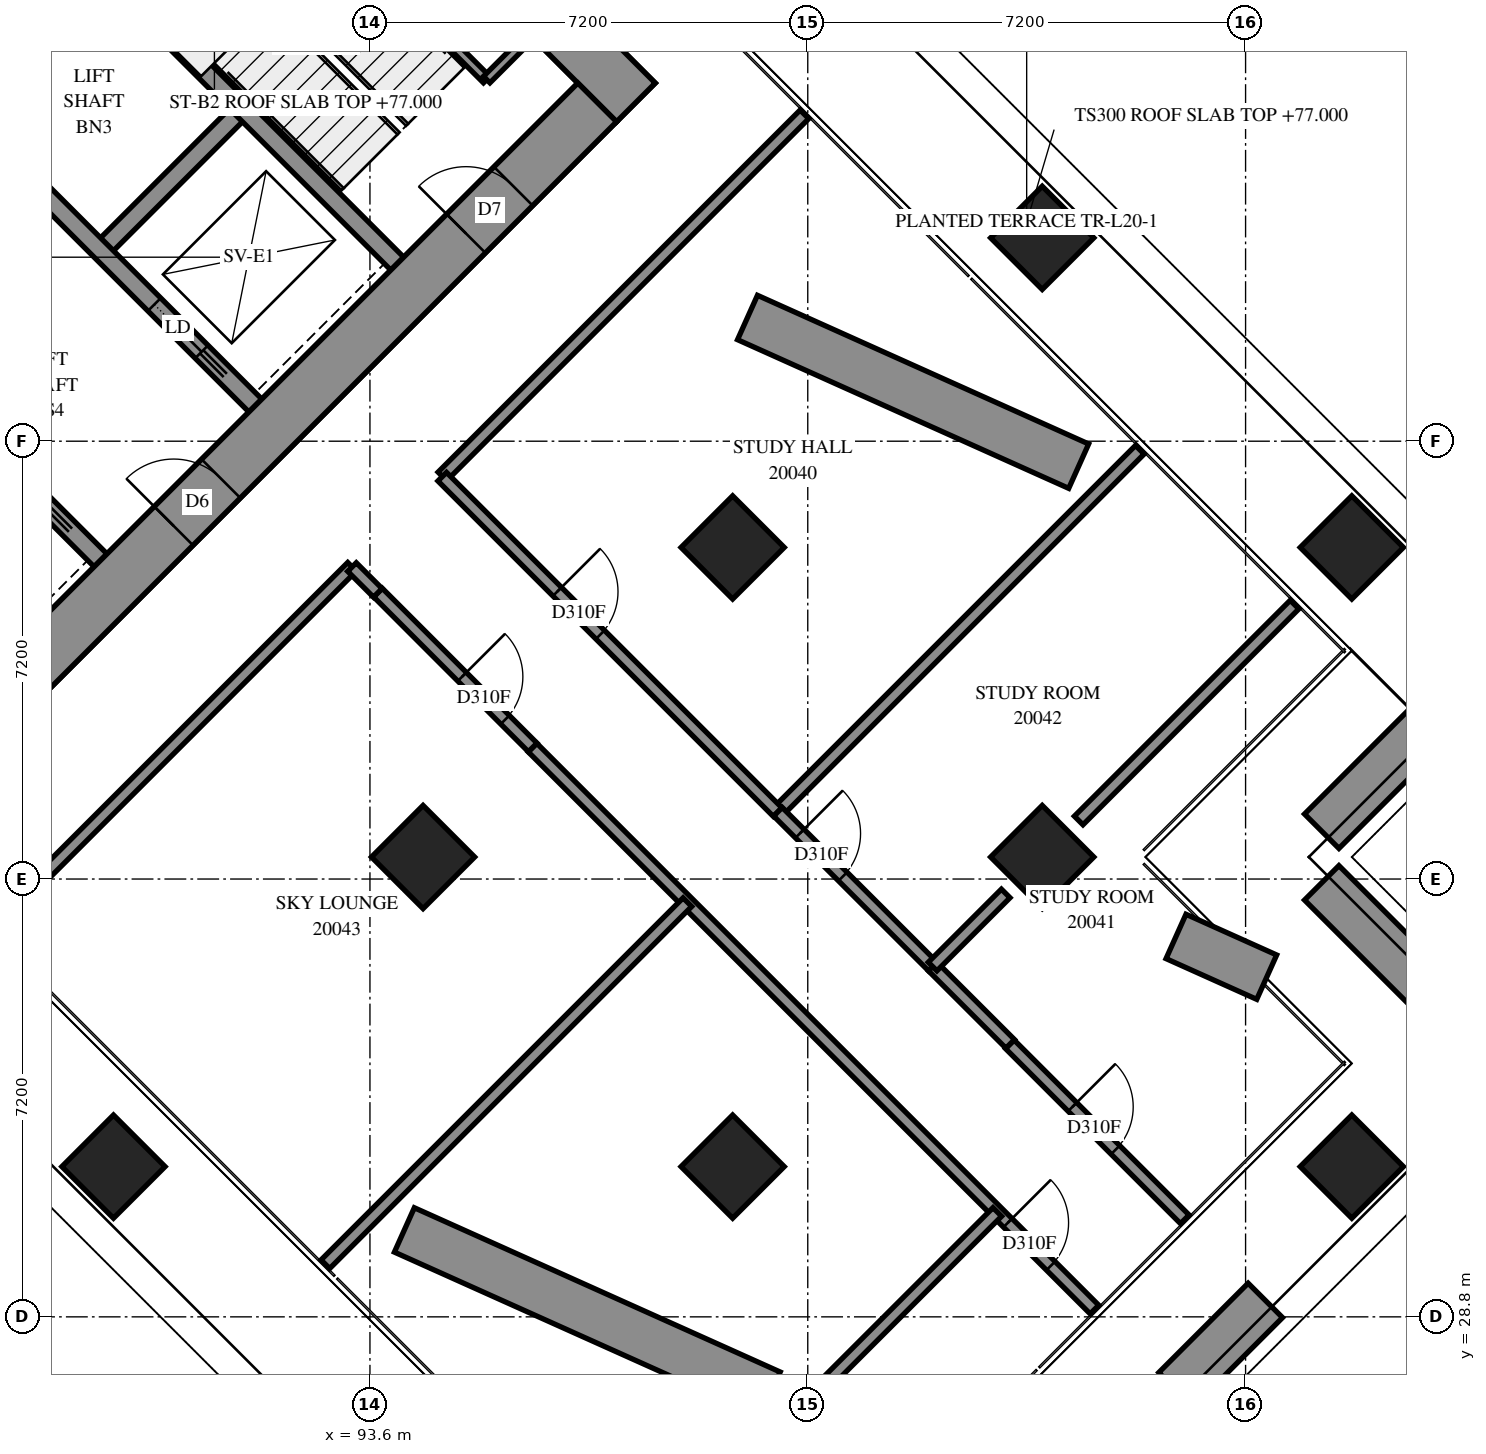
"""IFC4 building model, lengths in metres.
Left out: names, types, materials, properties, quantities, classifications, styles, units other than length and angle.
Written with IfcOpenShell. Run it as: python <this file> out.ifc"""

import sys

from ifc_helpers import new_model, si_unit, direction, frame, frame_2d, origin, origin_2d, place, context, subcontext, project, spatial, polyline, rectangle, outline, extrude, element, fill, save


model = new_model("IFC4")
c1 = context("Model", 3, precision=1e-05, world=origin(), true_north=direction((0.0, 1.0)))
c2 = subcontext(c1, "Body", "Model", "MODEL_VIEW")
j1 = project(units=[si_unit("LENGTHUNIT", "METRE"), si_unit("PLANEANGLEUNIT", "RADIAN")], contexts=[c1])
p1 = place(None, origin())
s1 = spatial("IfcSite", under=j1, at=p1, CompositionType="ELEMENT")
p2 = place(p1, origin())
s2 = spatial("IfcBuilding", under=s1, at=p2, CompositionType="ELEMENT")
p3 = place(p2, frame((0.0, 0.0, 77.0)))
s3 = spatial("IfcBuildingStorey", under=s2, at=p3, CompositionType="ELEMENT", Elevation=77.0)
for number, where, z_axis, x_axis in (
    (1, (104.656, 46.544, 0.0), (0.0, 0.0, 1.0), (0.707, -0.707, 0.0)),
    (2, (99.565, 41.453, 0.0), (0.0, 0.0, 1.0), (0.707, -0.707, 0.0)),
    (3, (94.474, 36.362, 0.0), (0.0, 0.0, 1.0), (0.707, -0.707, 0.0)),
    (4, (89.382, 31.271, 0.0), (0.0, 0.0, 1.0), (0.707, -0.707, 0.0)),
    (5, (109.747, 41.453, 0.0), (0.0, 0.0, 1.0), (0.707, -0.707, 0.0)),
    (6, (104.656, 36.362, 0.0), (0.0, 0.0, 1.0), (0.707, -0.707, 0.0)),
    (7, (99.565, 31.271, 0.0), (0.0, 0.0, 1.0), (0.707, -0.707, 0.0)),
    (8, (109.747, 31.271, 0.0), (0.0, 0.0, 1.0), (0.707, -0.707, 0.0)),
):
    element("IfcColumn", number, at=place(p3, frame(where, z_axis=z_axis, x_axis=x_axis)), inside=s3, PredefinedType="COLUMN", context=c2, shape_type="SweptSolid", body=[
        extrude(rectangle(XDim=1.2, YDim=1.2, at=origin_2d()), origin(), (0.0, 0.0, 1.0), 3.9),
    ])
p4 = place(p3, frame((86.519, 60.227, -0.3), z_axis=(0.0, 0.0, 1.0), x_axis=(0.7071036948, -0.7071098676, 0.0)))
e9 = element("IfcWall", 9, at=p4, inside=s3, PredefinedType="SHEAR", context=c2, shape_type="SweptSolid", body=[
    extrude(rectangle(XDim=16.2, YDim=0.9, at=frame_2d((8.1, 0.0))), origin(), (0.0, 0.0, 1.0), 3.5),
])
p5 = place(p4, frame((10.9, 0.0, 0.3)))
e10 = element("IfcOpeningElement", 10, at=p5, cuts=e9, PredefinedType="OPENING", context=c2, shape_type="SweptSolid", body=[
    extrude(rectangle(XDim=0.8, YDim=2.1, at=frame_2d((0.4, 1.05))), frame((0.0, 0.46, 0.0), z_axis=(0.0, -1.0, 0.0), x_axis=(1.0, 0.0, 0.0)), (0.0, 0.0, 1.0), 0.92),
])
p6 = place(p3, frame((87.155, 38.589, -0.3), z_axis=(0.0, 0.0, 1.0), x_axis=(0.7071067812, 0.7071067812, 0.0)))
e11 = element("IfcWall", 11, at=p6, inside=s3, PredefinedType="SHEAR", context=c2, shape_type="SweptSolid", body=[
    extrude(rectangle(XDim=14.4, YDim=0.9, at=frame_2d((7.2, 0.0))), origin(), (0.0, 0.0, 1.0), 3.5),
])
p7 = place(p6, frame((4.55, 0.0, 0.3)))
e12 = element("IfcOpeningElement", 12, at=p7, cuts=e11, PredefinedType="OPENING", context=c2, shape_type="SweptSolid", body=[
    extrude(rectangle(XDim=1.1, YDim=2.1, at=frame_2d((0.55, 1.05))), frame((0.0, 0.46, 0.0), z_axis=(0.0, -1.0, 0.0), x_axis=(1.0, 0.0, 0.0)), (0.0, 0.0, 1.0), 0.92),
])
p8 = place(p6, frame((11.35, 0.0, 0.3)))
e13 = element("IfcOpeningElement", 13, at=p8, cuts=e11, PredefinedType="OPENING", context=c2, shape_type="SweptSolid", body=[
    extrude(rectangle(XDim=1.1, YDim=2.1, at=frame_2d((0.55, 1.05))), frame((0.0, 0.46, 0.0), z_axis=(0.0, -1.0, 0.0), x_axis=(1.0, 0.0, 0.0)), (0.0, 0.0, 1.0), 0.92),
])
for number, where, z_axis, x_axis in (
    (14, (86.625, 48.878, 0.0), (0.0, 0.0, 1.0), (0.707, 0.707, 0.0)),
    (15, (89.17, 46.332, 0.0), (0.0, 0.0, 1.0), (0.707, 0.707, 0.0)),
):
    element("IfcWall", number, at=place(p3, frame(where, z_axis=z_axis, x_axis=x_axis)), inside=s3, PredefinedType="SOLIDWALL", context=c2, shape_type="SweptSolid", body=[
        extrude(rectangle(XDim=3.3, YDim=0.3, at=frame_2d((1.65, 0.0))), origin(), (0.0, 0.0, 1.0), 3.9),
    ])
p9 = place(p3, frame((78.988, 51.423, 0.0), z_axis=(0.0, 0.0, 1.0), x_axis=(0.7071067812, -0.7071067812, 0.0)))
e16 = element("IfcWall", 16, at=p9, inside=s3, PredefinedType="SOLIDWALL", context=c2, shape_type="SweptSolid", body=[
    extrude(rectangle(XDim=14.4, YDim=0.3, at=frame_2d((7.2, 0.0))), origin(), (0.0, 0.0, 1.0), 3.9),
])
p10 = place(p9, frame((1.25, 0.0, 0.0)))
e17 = element("IfcOpeningElement", 17, at=p10, cuts=e16, PredefinedType="OPENING", context=c2, shape_type="SweptSolid", body=[
    extrude(rectangle(XDim=1.1, YDim=2.1, at=frame_2d((0.55, 1.05))), frame((0.0, 0.16, 0.0), z_axis=(0.0, -1.0, 0.0), x_axis=(1.0, 0.0, 0.0)), (0.0, 0.0, 1.0), 0.32),
])
p11 = place(p9, frame((4.85, 0.0, 0.0)))
e18 = element("IfcOpeningElement", 18, at=p11, cuts=e16, PredefinedType="OPENING", context=c2, shape_type="SweptSolid", body=[
    extrude(rectangle(XDim=1.1, YDim=2.1, at=frame_2d((0.55, 1.05))), frame((0.0, 0.16, 0.0), z_axis=(0.0, -1.0, 0.0), x_axis=(1.0, 0.0, 0.0)), (0.0, 0.0, 1.0), 0.32),
])
p12 = place(p9, frame((8.45, 0.0, 0.0)))
e19 = element("IfcOpeningElement", 19, at=p12, cuts=e16, PredefinedType="OPENING", context=c2, shape_type="SweptSolid", body=[
    extrude(rectangle(XDim=1.1, YDim=2.1, at=frame_2d((0.55, 1.05))), frame((0.0, 0.16, 0.0), z_axis=(0.0, -1.0, 0.0), x_axis=(1.0, 0.0, 0.0)), (0.0, 0.0, 1.0), 0.32),
])
p13 = place(p9, frame((12.05, 0.0, 0.0)))
e20 = element("IfcOpeningElement", 20, at=p13, cuts=e16, PredefinedType="OPENING", context=c2, shape_type="SweptSolid", body=[
    extrude(rectangle(XDim=1.1, YDim=2.1, at=frame_2d((0.55, 1.05))), frame((0.0, 0.16, 0.0), z_axis=(0.0, -1.0, 0.0), x_axis=(1.0, 0.0, 0.0)), (0.0, 0.0, 1.0), 0.32),
])
p14 = place(p3, frame((81.534, 53.969, 0.0), z_axis=(0.0, 0.0, 1.0), x_axis=(0.707103309, -0.7071102534, 0.0)))
e21 = element("IfcWall", 21, at=p14, inside=s3, PredefinedType="SOLIDWALL", context=c2, shape_type="SweptSolid", body=[
    extrude(rectangle(XDim=14.4, YDim=0.3, at=frame_2d((7.2, 0.0))), origin(), (0.0, 0.0, 1.0), 3.9),
])
p15 = place(p14, frame((12.05, 0.0, 0.0)))
e22 = element("IfcOpeningElement", 22, at=p15, cuts=e21, PredefinedType="OPENING", context=c2, shape_type="SweptSolid", body=[
    extrude(rectangle(XDim=1.1, YDim=2.1, at=frame_2d((0.55, 1.05))), frame((0.0, 0.16, 0.0), z_axis=(0.0, -1.0, 0.0), x_axis=(1.0, 0.0, 0.0)), (0.0, 0.0, 1.0), 0.32),
])
p16 = place(p3, frame((88.958, 51.211, 0.0), z_axis=(0.0, 0.0, 1.0), x_axis=(0.7070998367, -0.7071137256, 0.0)))
e23 = element("IfcWall", 23, at=p16, inside=s3, PredefinedType="SOLIDWALL", context=c2, shape_type="SweptSolid", body=[
    extrude(rectangle(XDim=7.2, YDim=0.3, at=frame_2d((3.6, 0.0))), origin(), (0.0, 0.0, 1.0), 3.9),
])
p17 = place(p3, frame((106.856, 27.602, 0.0), z_axis=(0.0, 0.0, 1.0), x_axis=(0.7071067812, 0.7071067812, 0.0)))
e24 = element("IfcWall", 24, at=p17, inside=s3, PredefinedType="SOLIDWALL", context=c2, shape_type="SweptSolid", body=[
    extrude(rectangle(XDim=2.078, YDim=0.8, at=frame_2d((1.039, 0.0))), origin(), (0.0, 0.0, 1.0), 0.65),
])
for number, where, z_axis, x_axis in (
    (25, (111.798, 33.392, 0.0), (0.0, 0.0, 1.0), (-0.707, 0.707, 0.0)),
    (26, (109.252, 36.786, 0.0), (0.0, 0.0, 1.0), (0.707, 0.707, 0.0)),
):
    element("IfcWall", number, at=place(p3, frame(where, z_axis=z_axis, x_axis=x_axis)), inside=s3, PredefinedType="SOLIDWALL", context=c2, shape_type="SweptSolid", body=[
        extrude(rectangle(XDim=3.6, YDim=0.8, at=frame_2d((1.8, 0.0))), origin(), (0.0, 0.0, 1.0), 0.65),
    ])
p18 = place(p3, frame((105.255, 42.789, 0.0), z_axis=(0.0, 0.0, 1.0), x_axis=(-0.9122959724, 0.4095315113, 0.0)))
e27 = element("IfcWall", 27, at=p18, inside=s3, PredefinedType="SOLIDWALL", context=c2, shape_type="SweptSolid", body=[
    extrude(rectangle(XDim=5.97, YDim=0.8, at=frame_2d((2.985, 0.0))), origin(), (0.0, 0.0, 1.0), 0.65),
])
p19 = place(p3, frame((100.183, 27.528, 0.0), z_axis=(0.0, 0.0, 1.0), x_axis=(-0.9122941569, 0.4095355556, 0.0)))
e28 = element("IfcWall", 28, at=p19, inside=s3, PredefinedType="SOLIDWALL", context=c2, shape_type="SweptSolid", body=[
    extrude(rectangle(XDim=6.596, YDim=0.8, at=frame_2d((3.298, 0.0))), origin(), (0.0, 0.0, 1.0), 0.65),
])
p20 = place(p3, frame((91.313, 53.354, 0.0), z_axis=(0.0, 0.0, 1.0), x_axis=(0.7071067812, -0.7071067812, 0.0)))
e29 = element("IfcWall", 29, at=p20, inside=s3, PredefinedType="PARTITIONING", context=c2, shape_type="SweptSolid", body=[
    extrude(rectangle(XDim=5.95, YDim=0.15, at=frame_2d((2.975, 0.0))), origin(), (0.0, 0.0, 1.0), 3.9),
])
p21 = place(p3, frame((95.52, 49.146, 0.0), z_axis=(0.0, 0.0, 1.0), x_axis=(0.7071067812, 0.7071067812, 0.0)))
e30 = element("IfcWall", 30, at=p21, inside=s3, PredefinedType="PARTITIONING", context=c2, shape_type="SweptSolid", body=[
    extrude(rectangle(XDim=1.02, YDim=0.15, at=frame_2d((0.51, 0.0))), origin(), (0.0, 0.0, 1.0), 3.9),
])
p22 = place(p3, frame((96.274, 38.162, 0.0), z_axis=(0.0, 0.0, 1.0), x_axis=(0.7071067812, -0.7071067812, 0.0)))
e31 = element("IfcWall", 31, at=p22, inside=s3, PredefinedType="PARTITIONING", context=c2, shape_type="SweptSolid", body=[
    extrude(outline(polyline([(0.0, -0.1), (13.069, -0.1), (13.069, 0.1), (0.0, 0.1), (0.0, -0.1)])), origin(), (0.0, 0.0, 1.0), 3.9),
])
p23 = place(p22, frame((11.053, 0.0, 0.0)))
e32 = element("IfcOpeningElement", 32, at=p23, cuts=e31, PredefinedType="OPENING", context=c2, shape_type="SweptSolid", body=[
    extrude(rectangle(XDim=1.0, YDim=2.1, at=frame_2d((0.5, 1.05))), frame((0.0, 0.11, 0.0), z_axis=(0.0, -1.0, 0.0), x_axis=(1.0, 0.0, 0.0)), (0.0, 0.0, 1.0), 0.22),
])
p24 = place(p3, frame((97.961, 24.571, 0.0), z_axis=(0.0, 0.0, 1.0), x_axis=(0.7072255129, 0.7069880295, 0.0)))
e33 = element("IfcWall", 33, at=p24, inside=s3, PredefinedType="PARTITIONING", context=c2, shape_type="SweptSolid", body=[
    extrude(rectangle(XDim=8.422, YDim=0.2, at=frame_2d((4.211, 0.0))), origin(), (0.0, 0.0, 1.0), 3.9),
])
for number, where, z_axis, x_axis in (
    (34, (100.307, 37.105, 0.0), (0.0, 0.0, 1.0), (0.707, 0.707, 0.0)),
    (35, (92.867, 29.665, 0.0), (0.0, 0.0, 1.0), (0.707, 0.707, 0.0)),
    (36, (87.351, 35.181, 0.0), (0.0, 0.0, 1.0), (0.707, 0.707, 0.0)),
    (37, (94.791, 42.621, 0.0), (0.0, 0.0, 1.0), (0.707, 0.707, 0.0)),
):
    element("IfcWall", number, at=place(p3, frame(where, z_axis=z_axis, x_axis=x_axis)), inside=s3, PredefinedType="PARTITIONING", context=c2, shape_type="SweptSolid", body=[
        extrude(rectangle(XDim=8.42, YDim=0.2, at=frame_2d((4.21, 0.0))), origin(), (0.0, 0.0, 1.0), 3.9),
    ])
p25 = place(p3, frame((94.788, 42.617, 0.0), z_axis=(0.0, 0.0, 1.0), x_axis=(0.7071067812, -0.7071067812, 0.0)))
e38 = element("IfcWall", 38, at=p25, inside=s3, PredefinedType="PARTITIONING", context=c2, shape_type="SweptSolid", body=[
    extrude(rectangle(XDim=7.801, YDim=0.2, at=frame_2d((3.9, 0.0))), origin(), (0.0, 0.0, 1.0), 3.9),
])
p26 = place(p25, frame((2.674, 0.0, 0.0)))
e39 = element("IfcOpeningElement", 39, at=p26, cuts=e38, PredefinedType="OPENING", context=c2, shape_type="SweptSolid", body=[
    extrude(rectangle(XDim=1.0, YDim=2.1, at=frame_2d((0.5, 1.05))), frame((0.0, 0.11, 0.0), z_axis=(0.0, -1.0, 0.0), x_axis=(1.0, 0.0, 0.0)), (0.0, 0.0, 1.0), 0.22),
])
p27 = place(p3, frame((105.255, 36.963, 0.0), z_axis=(0.0, 0.0, 1.0), x_axis=(0.7071067812, 0.7071067812, 0.0)))
e40 = element("IfcWall", 40, at=p27, inside=s3, PredefinedType="PARTITIONING", context=c2, shape_type="SweptSolid", body=[
    extrude(rectangle(XDim=5.021, YDim=0.2, at=frame_2d((2.51, 0.0))), origin(), (0.0, 0.0, 1.0), 3.9),
])
p28 = place(p3, frame((104.123, 33.282, 0.0), z_axis=(0.0, 0.0, 1.0), x_axis=(0.7071067812, -0.7071067812, 0.0)))
e41 = element("IfcWall", 41, at=p28, inside=s3, PredefinedType="PARTITIONING", context=c2, shape_type="SweptSolid", body=[
    extrude(rectangle(XDim=4.07, YDim=0.2, at=frame_2d((2.035, 0.0))), origin(), (0.0, 0.0, 1.0), 3.9),
])
p29 = place(p28, frame((1.456, 0.0, 0.0)))
e42 = element("IfcOpeningElement", 42, at=p29, cuts=e41, PredefinedType="OPENING", context=c2, shape_type="SweptSolid", body=[
    extrude(rectangle(XDim=1.0, YDim=2.1, at=frame_2d((0.5, 1.05))), frame((0.0, 0.11, 0.0), z_axis=(0.0, -1.0, 0.0), x_axis=(1.0, 0.0, 0.0)), (0.0, 0.0, 1.0), 0.22),
])
p30 = place(p3, frame((93.732, 40.71, 0.0), z_axis=(0.0, 0.0, 1.0), x_axis=(0.7068288851, -0.7073845681, 0.0)))
e43 = element("IfcWall", 43, at=p30, inside=s3, PredefinedType="PARTITIONING", context=c2, shape_type="SweptSolid", body=[
    extrude(rectangle(XDim=3.599, YDim=0.2, at=frame_2d((1.8, 0.0))), origin(), (0.0, 0.0, 1.0), 3.9),
])
p31 = place(p30, frame((1.956, 0.0, 0.0)))
e44 = element("IfcOpeningElement", 44, at=p31, cuts=e43, PredefinedType="OPENING", context=c2, shape_type="SweptSolid", body=[
    extrude(rectangle(XDim=1.0, YDim=2.1, at=frame_2d((0.5, 1.05))), frame((0.0, 0.11, 0.0), z_axis=(0.0, -1.0, 0.0), x_axis=(1.0, 0.0, 0.0)), (0.0, 0.0, 1.0), 0.22),
])
p32 = place(p3, frame((100.31, 37.106, 0.0), z_axis=(0.0, 0.0, 1.0), x_axis=(0.7073845681, -0.7068288851, 0.0)))
e45 = element("IfcWall", 45, at=p32, inside=s3, PredefinedType="PARTITIONING", context=c2, shape_type="SweptSolid", body=[
    extrude(rectangle(XDim=3.599, YDim=0.2, at=frame_2d((1.8, 0.0))), origin(), (0.0, 0.0, 1.0), 3.9),
])
p33 = place(p32, frame((0.507, 0.0, 0.0)))
e46 = element("IfcOpeningElement", 46, at=p33, cuts=e45, PredefinedType="OPENING", context=c2, shape_type="SweptSolid", body=[
    extrude(rectangle(XDim=1.0, YDim=2.1, at=frame_2d((0.5, 1.05))), frame((0.0, 0.11, 0.0), z_axis=(0.0, -1.0, 0.0), x_axis=(1.0, 0.0, 0.0)), (0.0, 0.0, 1.0), 0.22),
])
p34 = place(p3, frame((102.855, 34.561, 0.0), z_axis=(0.0, 0.0, 1.0), x_axis=(0.7076620277, -0.7065510983, 0.0)))
e47 = element("IfcWall", 47, at=p34, inside=s3, PredefinedType="PARTITIONING", context=c2, shape_type="SweptSolid", body=[
    extrude(rectangle(XDim=1.8, YDim=0.2, at=frame_2d((0.9, 0.0))), origin(), (0.0, 0.0, 1.0), 3.9),
])
p35 = place(p3, frame((102.853, 34.561, 0.0), z_axis=(0.0, 0.0, 1.0), x_axis=(0.7071067812, 0.7071067812, 0.0)))
e48 = element("IfcWall", 48, at=p35, inside=s3, PredefinedType="PARTITIONING", context=c2, shape_type="SweptSolid", body=[
    extrude(rectangle(XDim=1.7, YDim=0.2, at=frame_2d((0.85, 0.0))), origin(), (0.0, 0.0, 1.0), 3.9),
])
p36 = place(p3, frame((93.305, 41.131, 0.0), z_axis=(0.0, 0.0, 1.0), x_axis=(0.7071067812, -0.7071067812, 0.0)))
e49 = element("IfcWall", 49, at=p36, inside=s3, PredefinedType="PARTITIONING", context=c2, shape_type="SweptSolid", body=[
    extrude(rectangle(XDim=0.6, YDim=0.2, at=frame_2d((0.3, 0.0))), origin(), (0.0, 0.0, 1.0), 3.9),
])
p37 = place(p3, frame((108.347, 34.386, 0.0), z_axis=(0.0, 0.0, 1.0), x_axis=(-0.9122919194, 0.4095405398, 0.0)))
e50 = element("IfcWall", 50, at=p37, inside=s3, PredefinedType="SOLIDWALL", context=c2, shape_type="SweptSolid", body=[
    extrude(outline(polyline([(0.0, -0.4), (1.635, -0.4), (1.635, 0.4), (0.0, 0.4), (0.0, -0.4)])), origin(), (0.0, 0.0, 1.0), 0.65),
])
p38 = place(p7, origin())
e51 = element("IfcDoor", 51, at=p38, inside=s3, OperationType="DOUBLE_DOOR_SINGLE_SWING", PredefinedType="DOOR", context=c2, shape_type="SweptSolid", body=[
    extrude(rectangle(XDim=1.1, YDim=2.1, at=frame_2d((0.55, 1.05))), frame((0.0, 0.025, 0.0), z_axis=(0.0, -1.0, 0.0), x_axis=(1.0, 0.0, 0.0)), (0.0, 0.0, 1.0), 0.05),
])
fill(e12, e51)
p39 = place(p8, origin())
e52 = element("IfcDoor", 52, at=p39, inside=s3, OperationType="SINGLE_SWING_RIGHT", PredefinedType="DOOR", context=c2, shape_type="SweptSolid", body=[
    extrude(rectangle(XDim=1.1, YDim=2.1, at=frame_2d((0.55, 1.05))), frame((0.0, 0.025, 0.0), z_axis=(0.0, -1.0, 0.0), x_axis=(1.0, 0.0, 0.0)), (0.0, 0.0, 1.0), 0.05),
])
fill(e13, e52)
p40 = place(p15, origin())
e53 = element("IfcDoor", 53, at=p40, inside=s3, OperationType="SLIDING_TO_RIGHT", PredefinedType="DOOR", context=c2, shape_type="SweptSolid", body=[
    extrude(rectangle(XDim=1.1, YDim=2.1, at=frame_2d((0.55, 1.05))), frame((0.0, 0.025, 0.0), z_axis=(0.0, -1.0, 0.0), x_axis=(1.0, 0.0, 0.0)), (0.0, 0.0, 1.0), 0.05),
])
fill(e22, e53)
p41 = place(p26, origin())
e54 = element("IfcDoor", 54, at=p41, inside=s3, OperationType="SINGLE_SWING_RIGHT", PredefinedType="DOOR", context=c2, shape_type="SweptSolid", body=[
    extrude(rectangle(XDim=1.0, YDim=2.1, at=frame_2d((0.5, 1.05))), frame((0.0, 0.025, 0.0), z_axis=(0.0, -1.0, 0.0), x_axis=(1.0, 0.0, 0.0)), (0.0, 0.0, 1.0), 0.05),
])
fill(e39, e54)
p42 = place(p29, origin())
e55 = element("IfcDoor", 55, at=p42, inside=s3, OperationType="SINGLE_SWING_LEFT", PredefinedType="DOOR", context=c2, shape_type="SweptSolid", body=[
    extrude(rectangle(XDim=1.0, YDim=2.1, at=frame_2d((0.5, 1.05))), frame((0.0, 0.025, 0.0), z_axis=(0.0, -1.0, 0.0), x_axis=(1.0, 0.0, 0.0)), (0.0, 0.0, 1.0), 0.05),
])
fill(e42, e55)
p43 = place(p33, origin())
e56 = element("IfcDoor", 56, at=p43, inside=s3, OperationType="SINGLE_SWING_RIGHT", PredefinedType="DOOR", context=c2, shape_type="SweptSolid", body=[
    extrude(rectangle(XDim=1.0, YDim=2.1, at=frame_2d((0.5, 1.05))), frame((0.0, 0.025, 0.0), z_axis=(0.0, -1.0, 0.0), x_axis=(1.0, 0.0, 0.0)), (0.0, 0.0, 1.0), 0.05),
])
fill(e46, e56)
p44 = place(p31, origin())
e57 = element("IfcDoor", 57, at=p44, inside=s3, OperationType="SINGLE_SWING_LEFT", PredefinedType="DOOR", context=c2, shape_type="SweptSolid", body=[
    extrude(rectangle(XDim=1.0, YDim=2.1, at=frame_2d((0.5, 1.05))), frame((0.0, 0.025, 0.0), z_axis=(0.0, -1.0, 0.0), x_axis=(1.0, 0.0, 0.0)), (0.0, 0.0, 1.0), 0.05),
])
fill(e44, e57)
p45 = place(p23, origin())
e58 = element("IfcDoor", 58, at=p45, inside=s3, OperationType="SINGLE_SWING_LEFT", PredefinedType="DOOR", context=c2, shape_type="SweptSolid", body=[
    extrude(rectangle(XDim=1.0, YDim=2.1, at=frame_2d((0.5, 1.05))), frame((0.0, 0.025, 0.0), z_axis=(0.0, -1.0, 0.0), x_axis=(1.0, 0.0, 0.0)), (0.0, 0.0, 1.0), 0.05),
])
fill(e32, e58)
save(model, sys.argv[1])
